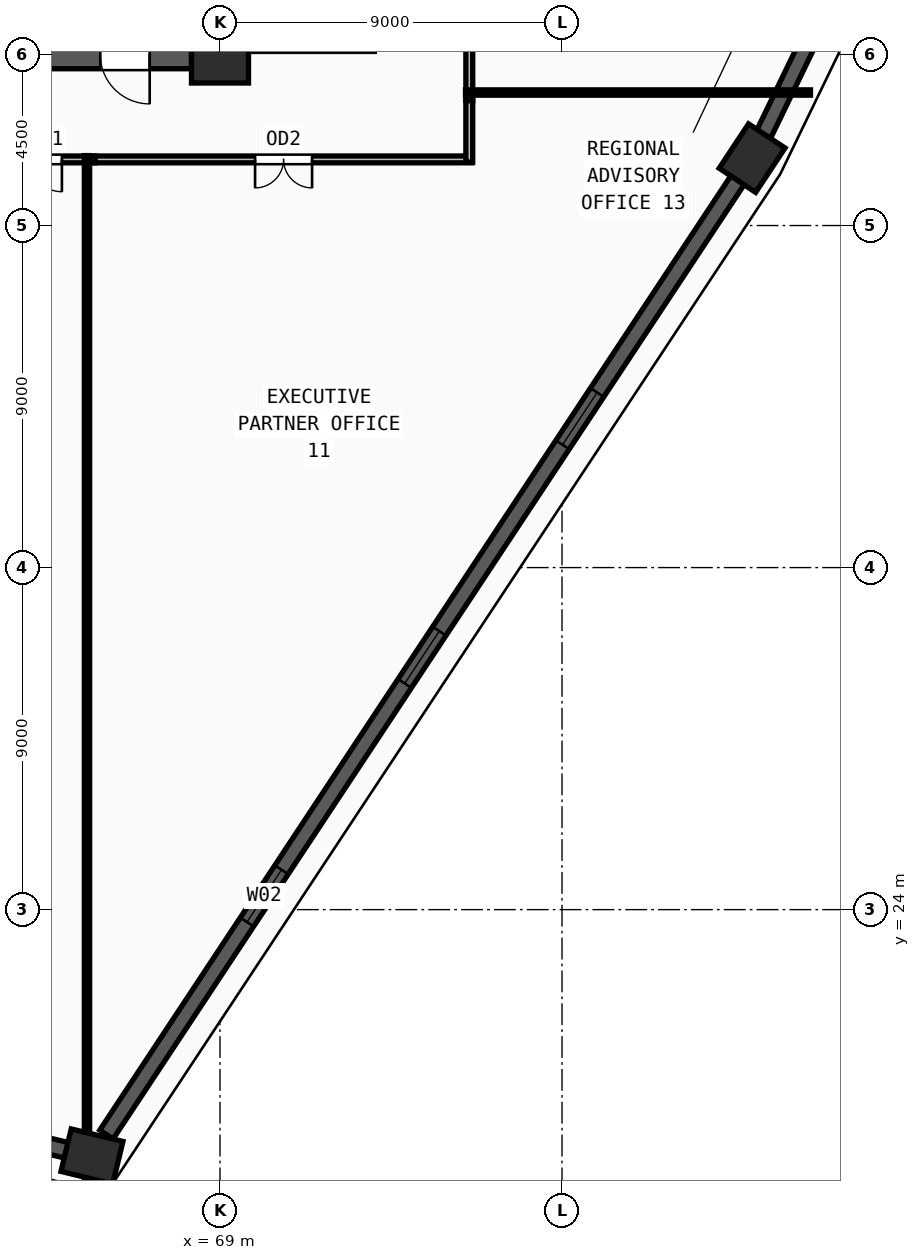
"""IFC4 building model, lengths in metres.
Left out: names, types, materials, properties, quantities, classifications, styles, units other than length and angle.
Written with IfcOpenShell. Run it as: python <this file> out.ifc"""

import sys

from ifc_helpers import new_model, si_unit, direction, frame, frame_2d, origin, origin_2d, place, context, subcontext, project, spatial, rectangle, extrude, source, transform, mapped, element, fill, save


model = new_model("IFC4")
c1 = context("Model", 3, precision=1e-05, world=origin(), true_north=direction((0.0, 1.0)))
c2 = subcontext(c1, "Body", "Model", "MODEL_VIEW")
j1 = project(units=[si_unit("LENGTHUNIT", "METRE"), si_unit("PLANEANGLEUNIT", "RADIAN")], contexts=[c1])
p1 = place(None, origin())
s1 = spatial("IfcSite", under=j1, at=p1, CompositionType="ELEMENT")
p2 = place(p1, origin())
s2 = spatial("IfcBuilding", under=s1, at=p2, CompositionType="ELEMENT")
p3 = place(p2, frame((0.0, 0.0, 177.75)))
s3 = spatial("IfcBuildingStorey", under=s2, at=p3, CompositionType="ELEMENT", Elevation=177.75)
m1 = source(origin(), c2, "Body", "SweptSolid", [
    extrude(rectangle(XDim=1.5, YDim=1.5, at=origin_2d()), origin(), (0.0, 0.0, 1.0), 3.75),
])
p4 = place(p3, frame((69.0, 46.5, 0.0), z_axis=(0.0, 0.0, 1.0), x_axis=(1.0, 0.0, 0.0)))
e1 = element("IfcColumn", 1, at=p4, inside=s3, PredefinedType="COLUMN", context=c2, shape_type="MappedRepresentation", body=[
    mapped(m1, transform((0.0, 0.0, 0.0), x_axis=(1.0, 0.0, 0.0), y_axis=(0.0, 1.0, 0.0), z_axis=(0.0, 0.0, 1.0), scale=1.0)),
])
m2 = source(origin(), c2, "Body", "SweptSolid", [
    extrude(rectangle(XDim=1.4, YDim=1.15, at=origin_2d()), origin(), (0.0, 0.0, 1.0), 3.75),
])
for number, where, z_axis, x_axis in (
    (2, (83.002, 43.774, 0.0), (0.0, 0.0, 1.0), (0.552, 0.834, 0.0)),
    (3, (65.631, 17.506, 0.0), (0.0, 0.0, 1.0), (-0.972, 0.235, 0.0)),
):
    element("IfcColumn", number, at=place(p3, frame(where, z_axis=z_axis, x_axis=x_axis)), inside=s3, PredefinedType="COLUMN", context=c2, shape_type="MappedRepresentation", body=[
        mapped(m2, transform((0.0, 0.0, 0.0), x_axis=(1.0, 0.0, 0.0), y_axis=(0.0, 1.0, 0.0), z_axis=(0.0, 0.0, 1.0), scale=1.0)),
    ])
p5 = place(p3, frame((60.671, 18.704, 0.0), z_axis=(0.0, 0.0, 1.0), x_axis=(0.972038673822, -0.234820818061, 0.0)))
e4 = element("IfcWall", 4, at=p5, inside=s3, PredefinedType="SOLIDWALL", context=c2, shape_type="SweptSolid", body=[
    extrude(rectangle(XDim=4.412, YDim=0.42, at=frame_2d((2.206, 0.0))), origin(), (0.0, 0.0, 1.0), 3.57),
])
m3 = source(origin(), c2, "Body", "SweptSolid", [
    extrude(rectangle(XDim=1.2, YDim=1.9, at=frame_2d((0.6, 0.95))), frame((0.0, 0.22, 0.0), z_axis=(0.0, -1.0, 0.0), x_axis=(1.0, 0.0, 0.0)), (0.0, 0.0, 1.0), 0.44),
])
p6 = place(p5, frame((1.606, 0.0, 0.55)))
e5 = element("IfcOpeningElement", 5, at=p6, cuts=e4, PredefinedType="OPENING", context=c2, shape_type="MappedRepresentation", body=[
    mapped(m3, transform((0.0, 0.0, 0.0), x_axis=(1.0, 0.0, 0.0), y_axis=(0.0, 1.0, 0.0), z_axis=(0.0, 0.0, 1.0), scale=1.0)),
])
p7 = place(p3, frame((66.012, 18.082, 0.0), z_axis=(0.0, 0.0, 1.0), x_axis=(0.551595967402, 0.834111436647, 0.0)))
e6 = element("IfcWall", 6, at=p7, inside=s3, PredefinedType="SOLIDWALL", context=c2, shape_type="SweptSolid", body=[
    extrude(rectangle(XDim=30.111, YDim=0.42, at=frame_2d((15.056, 0.0))), origin(), (0.0, 0.0, 1.0), 3.57),
])
m4 = source(origin(), c2, "Body", "SweptSolid", [
    extrude(rectangle(XDim=1.65, YDim=1.95, at=frame_2d((0.825, 0.975))), frame((0.0, 0.22, 0.0), z_axis=(0.0, -1.0, 0.0), x_axis=(1.0, 0.0, 0.0)), (0.0, 0.0, 1.0), 0.44),
])
p8 = place(p7, frame((6.703, 0.0, 0.55)))
e7 = element("IfcOpeningElement", 7, at=p8, cuts=e6, PredefinedType="OPENING", context=c2, shape_type="MappedRepresentation", body=[
    mapped(m4, transform((0.0, 0.0, 0.0), x_axis=(1.0, 0.0, 0.0), y_axis=(0.0, 1.0, 0.0), z_axis=(0.0, 0.0, 1.0), scale=1.0)),
])
p9 = place(p7, frame((14.231, 0.0, 0.55)))
e8 = element("IfcOpeningElement", 8, at=p9, cuts=e6, PredefinedType="OPENING", context=c2, shape_type="MappedRepresentation", body=[
    mapped(m4, transform((0.0, 0.0, 0.0), x_axis=(1.0, 0.0, 0.0), y_axis=(0.0, 1.0, 0.0), z_axis=(0.0, 0.0, 1.0), scale=1.0)),
])
p10 = place(p7, frame((21.758, 0.0, 0.55)))
e9 = element("IfcOpeningElement", 9, at=p10, cuts=e6, PredefinedType="OPENING", context=c2, shape_type="MappedRepresentation", body=[
    mapped(m4, transform((0.0, 0.0, 0.0), x_axis=(1.0, 0.0, 0.0), y_axis=(0.0, 1.0, 0.0), z_axis=(0.0, 0.0, 1.0), scale=1.0)),
])
p11 = place(p3, frame((83.303, 44.395, 0.0), z_axis=(0.0, 0.0, 1.0), x_axis=(0.435791696433, 0.90004755281, 0.0)))
e10 = element("IfcWall", 10, at=p11, inside=s3, PredefinedType="SOLIDWALL", context=c2, shape_type="SweptSolid", body=[
    extrude(rectangle(XDim=24.831, YDim=0.42, at=frame_2d((12.416, 0.0))), origin(), (0.0, 0.0, 1.0), 3.57),
])
p12 = place(p11, frame((5.383, 0.0, 0.55)))
e11 = element("IfcOpeningElement", 11, at=p12, cuts=e10, PredefinedType="OPENING", context=c2, shape_type="MappedRepresentation", body=[
    mapped(m4, transform((0.0, 0.0, 0.0), x_axis=(1.0, 0.0, 0.0), y_axis=(0.0, 1.0, 0.0), z_axis=(0.0, 0.0, 1.0), scale=1.0)),
])
p13 = place(p11, frame((17.798, 0.0, 0.55)))
e12 = element("IfcOpeningElement", 12, at=p13, cuts=e10, PredefinedType="OPENING", context=c2, shape_type="MappedRepresentation", body=[
    mapped(m4, transform((0.0, 0.0, 0.0), x_axis=(1.0, 0.0, 0.0), y_axis=(0.0, 1.0, 0.0), z_axis=(0.0, 0.0, 1.0), scale=1.0)),
])
p14 = place(p3, frame((68.25, 46.5, 0.0), z_axis=(0.0, 0.0, 1.0), x_axis=(-1.0, 0.0, 0.0)))
e13 = element("IfcWall", 13, at=p14, inside=s3, PredefinedType="SHEAR", context=c2, shape_type="SweptSolid", body=[
    extrude(rectangle(XDim=7.5, YDim=0.75, at=frame_2d((3.75, 0.0))), origin(), (0.0, 0.0, 1.0), 3.57),
])
m5 = source(origin(), c2, "Body", "SweptSolid", [
    extrude(rectangle(XDim=1.3, YDim=2.2, at=frame_2d((0.65, 1.1))), frame((0.0, 0.385, 0.0), z_axis=(0.0, -1.0, 0.0), x_axis=(1.0, 0.0, 0.0)), (0.0, 0.0, 1.0), 0.77),
])
p15 = place(p14, frame((1.1, 0.0, 0.0)))
e14 = element("IfcOpeningElement", 14, at=p15, cuts=e13, PredefinedType="OPENING", context=c2, shape_type="MappedRepresentation", body=[
    mapped(m5, transform((0.0, 0.0, 0.0), x_axis=(1.0, 0.0, 0.0), y_axis=(0.0, 1.0, 0.0), z_axis=(0.0, 0.0, 1.0), scale=1.0)),
])
p16 = place(p3, frame((65.715, 43.74, 0.0), z_axis=(0.0, 0.0, 1.0), x_axis=(-1.0, 0.0, 0.0)))
e15 = element("IfcWall", 15, at=p16, inside=s3, PredefinedType="PARTITIONING", context=c2, shape_type="SweptSolid", body=[
    extrude(rectangle(XDim=11.0, YDim=0.18, at=frame_2d((5.5, 0.0))), origin(), (0.0, 0.0, 1.0), 3.57),
])
m6 = source(origin(), c2, "Body", "SweptSolid", [
    extrude(rectangle(XDim=0.85, YDim=2.1, at=frame_2d((0.425, 1.05))), frame((0.0, 0.1, 0.0), z_axis=(0.0, -1.0, 0.0), x_axis=(1.0, 0.0, 0.0)), (0.0, 0.0, 1.0), 0.2),
])
p17 = place(p16, frame((0.875, 0.0, 0.0)))
e16 = element("IfcOpeningElement", 16, at=p17, cuts=e15, PredefinedType="OPENING", context=c2, shape_type="MappedRepresentation", body=[
    mapped(m6, transform((0.0, 0.0, 0.0), x_axis=(1.0, 0.0, 0.0), y_axis=(0.0, 1.0, 0.0), z_axis=(0.0, 0.0, 1.0), scale=1.0)),
])
p18 = place(p3, frame((75.63, 43.74, 0.0), z_axis=(0.0, 0.0, 1.0), x_axis=(-1.0, 0.0, 0.0)))
e17 = element("IfcWall", 17, at=p18, inside=s3, PredefinedType="PARTITIONING", context=c2, shape_type="SweptSolid", body=[
    extrude(rectangle(XDim=9.915, YDim=0.18, at=frame_2d((4.958, 0.0))), origin(), (0.0, 0.0, 1.0), 3.57),
])
m7 = source(origin(), c2, "Body", "SweptSolid", [
    extrude(rectangle(XDim=1.5, YDim=2.2, at=frame_2d((0.75, 1.1))), frame((0.0, 0.1, 0.0), z_axis=(0.0, -1.0, 0.0), x_axis=(1.0, 0.0, 0.0)), (0.0, 0.0, 1.0), 0.2),
])
p19 = place(p18, frame((4.207, 0.0, 0.0)))
e18 = element("IfcOpeningElement", 18, at=p19, cuts=e17, PredefinedType="OPENING", context=c2, shape_type="MappedRepresentation", body=[
    mapped(m7, transform((0.0, 0.0, 0.0), x_axis=(1.0, 0.0, 0.0), y_axis=(0.0, 1.0, 0.0), z_axis=(0.0, 0.0, 1.0), scale=1.0)),
])
p20 = place(p3, frame((75.56, 52.215, 0.0), z_axis=(0.0, 0.0, 1.0), x_axis=(0.0, -1.0, 0.0)))
e19 = element("IfcWall", 19, at=p20, inside=s3, PredefinedType="PARTITIONING", context=c2, shape_type="SweptSolid", body=[
    extrude(rectangle(XDim=6.93, YDim=0.18, at=frame_2d((3.465, 0.0))), origin(), (0.0, 0.0, 1.0), 3.155),
])
m8 = source(origin(), c2, "Body", "SweptSolid", [
    extrude(rectangle(XDim=1.0, YDim=2.2, at=frame_2d((0.5, 1.1))), frame((0.0, 0.1, 0.0), z_axis=(0.0, -1.0, 0.0), x_axis=(1.0, 0.0, 0.0)), (0.0, 0.0, 1.0), 0.2),
])
p21 = place(p20, frame((2.965, 0.0, 0.0)))
e20 = element("IfcOpeningElement", 20, at=p21, cuts=e19, PredefinedType="OPENING", context=c2, shape_type="MappedRepresentation", body=[
    mapped(m8, transform((0.0, 0.0, 0.0), x_axis=(1.0, 0.0, 0.0), y_axis=(0.0, 1.0, 0.0), z_axis=(0.0, 0.0, 1.0), scale=1.0)),
])
p22 = place(p3, frame((75.56, 45.285, 0.0), z_axis=(0.0, 0.0, 1.0), x_axis=(0.0, -1.0, 0.0)))
e21 = element("IfcWall", 21, at=p22, inside=s3, PredefinedType="PARTITIONING", context=c2, shape_type="SweptSolid", body=[
    extrude(rectangle(XDim=1.615, YDim=0.18, at=frame_2d((0.808, 0.0))), origin(), (0.0, 0.0, 1.0), 3.57),
])
p23 = place(p3, frame((75.46, 45.5, 0.0), z_axis=(0.0, 0.0, 1.0), x_axis=(1.0, 0.0, 0.0)))
e22 = element("IfcWall", 22, at=p23, inside=s3, PredefinedType="PARTITIONING", context=c2, shape_type="SweptSolid", body=[
    extrude(rectangle(XDim=9.078, YDim=0.14, at=frame_2d((4.539, 0.0))), origin(), (0.0, 0.0, 1.0), 3.57),
])
p24 = place(p3, frame((65.5, 43.84, 0.0), z_axis=(0.0, 0.0, 1.0), x_axis=(0.0, -1.0, 0.0)))
e23 = element("IfcWall", 23, at=p24, inside=s3, PredefinedType="PARTITIONING", context=c2, shape_type="SweptSolid", body=[
    extrude(rectangle(XDim=26.95, YDim=0.14, at=frame_2d((13.475, 0.0))), origin(), (0.0, 0.0, 1.0), 2.755),
])
m9 = source(origin(), c2, "Body", "SweptSolid", [
    extrude(rectangle(XDim=1.65, YDim=1.95, at=frame_2d((0.825, 0.975))), frame((0.0, 0.03, 0.0), z_axis=(0.0, -1.0, 0.0), x_axis=(1.0, 0.0, 0.0)), (0.0, 0.0, 1.0), 0.06),
])
p25 = place(p8, origin())
e24 = element("IfcWindow", 24, at=p25, inside=s3, PartitioningType="DOUBLE_PANEL_VERTICAL", PredefinedType="WINDOW", context=c2, shape_type="MappedRepresentation", body=[
    mapped(m9, transform((0.0, 0.0, 0.0), x_axis=(1.0, 0.0, 0.0), y_axis=(0.0, 1.0, 0.0), z_axis=(0.0, 0.0, 1.0), scale=1.0)),
])
fill(e7, e24)
p26 = place(p9, origin())
e25 = element("IfcWindow", 25, at=p26, inside=s3, PartitioningType="DOUBLE_PANEL_VERTICAL", PredefinedType="WINDOW", context=c2, shape_type="MappedRepresentation", body=[
    mapped(m9, transform((0.0, 0.0, 0.0), x_axis=(1.0, 0.0, 0.0), y_axis=(0.0, 1.0, 0.0), z_axis=(0.0, 0.0, 1.0), scale=1.0)),
])
fill(e8, e25)
p27 = place(p10, origin())
e26 = element("IfcWindow", 26, at=p27, inside=s3, PartitioningType="DOUBLE_PANEL_VERTICAL", PredefinedType="WINDOW", context=c2, shape_type="MappedRepresentation", body=[
    mapped(m9, transform((0.0, 0.0, 0.0), x_axis=(1.0, 0.0, 0.0), y_axis=(0.0, 1.0, 0.0), z_axis=(0.0, 0.0, 1.0), scale=1.0)),
])
fill(e9, e26)
m10 = source(origin(), c2, "Body", "SweptSolid", [
    extrude(rectangle(XDim=1.3, YDim=2.2, at=frame_2d((0.65, 1.1))), frame((0.0, 0.025, 0.0), z_axis=(0.0, -1.0, 0.0), x_axis=(1.0, 0.0, 0.0)), (0.0, 0.0, 1.0), 0.05),
])
p28 = place(p15, origin())
e27 = element("IfcDoor", 27, at=p28, inside=s3, OperationType="SINGLE_SWING_LEFT", PredefinedType="DOOR", context=c2, shape_type="MappedRepresentation", body=[
    mapped(m10, transform((0.0, 0.0, 0.0), x_axis=(1.0, 0.0, 0.0), y_axis=(0.0, 1.0, 0.0), z_axis=(0.0, 0.0, 1.0), scale=1.0)),
])
fill(e14, e27)
m11 = source(origin(), c2, "Body", "SweptSolid", [
    extrude(rectangle(XDim=0.85, YDim=2.1, at=frame_2d((0.425, 1.05))), frame((0.0, 0.025, 0.0), z_axis=(0.0, -1.0, 0.0), x_axis=(1.0, 0.0, 0.0)), (0.0, 0.0, 1.0), 0.05),
])
p29 = place(p17, origin())
e28 = element("IfcDoor", 28, at=p29, inside=s3, OperationType="SINGLE_SWING_LEFT", PredefinedType="DOOR", context=c2, shape_type="MappedRepresentation", body=[
    mapped(m11, transform((0.0, 0.0, 0.0), x_axis=(1.0, 0.0, 0.0), y_axis=(0.0, 1.0, 0.0), z_axis=(0.0, 0.0, 1.0), scale=1.0)),
])
fill(e16, e28)
m12 = source(origin(), c2, "Body", "SweptSolid", [
    extrude(rectangle(XDim=1.5, YDim=2.2, at=frame_2d((0.75, 1.1))), frame((0.0, 0.025, 0.0), z_axis=(0.0, -1.0, 0.0), x_axis=(1.0, 0.0, 0.0)), (0.0, 0.0, 1.0), 0.05),
])
p30 = place(p19, origin())
e29 = element("IfcDoor", 29, at=p30, inside=s3, OperationType="DOUBLE_DOOR_SINGLE_SWING", PredefinedType="DOOR", context=c2, shape_type="MappedRepresentation", body=[
    mapped(m12, transform((0.0, 0.0, 0.0), x_axis=(1.0, 0.0, 0.0), y_axis=(0.0, 1.0, 0.0), z_axis=(0.0, 0.0, 1.0), scale=1.0)),
])
fill(e18, e29)
save(model, sys.argv[1])
